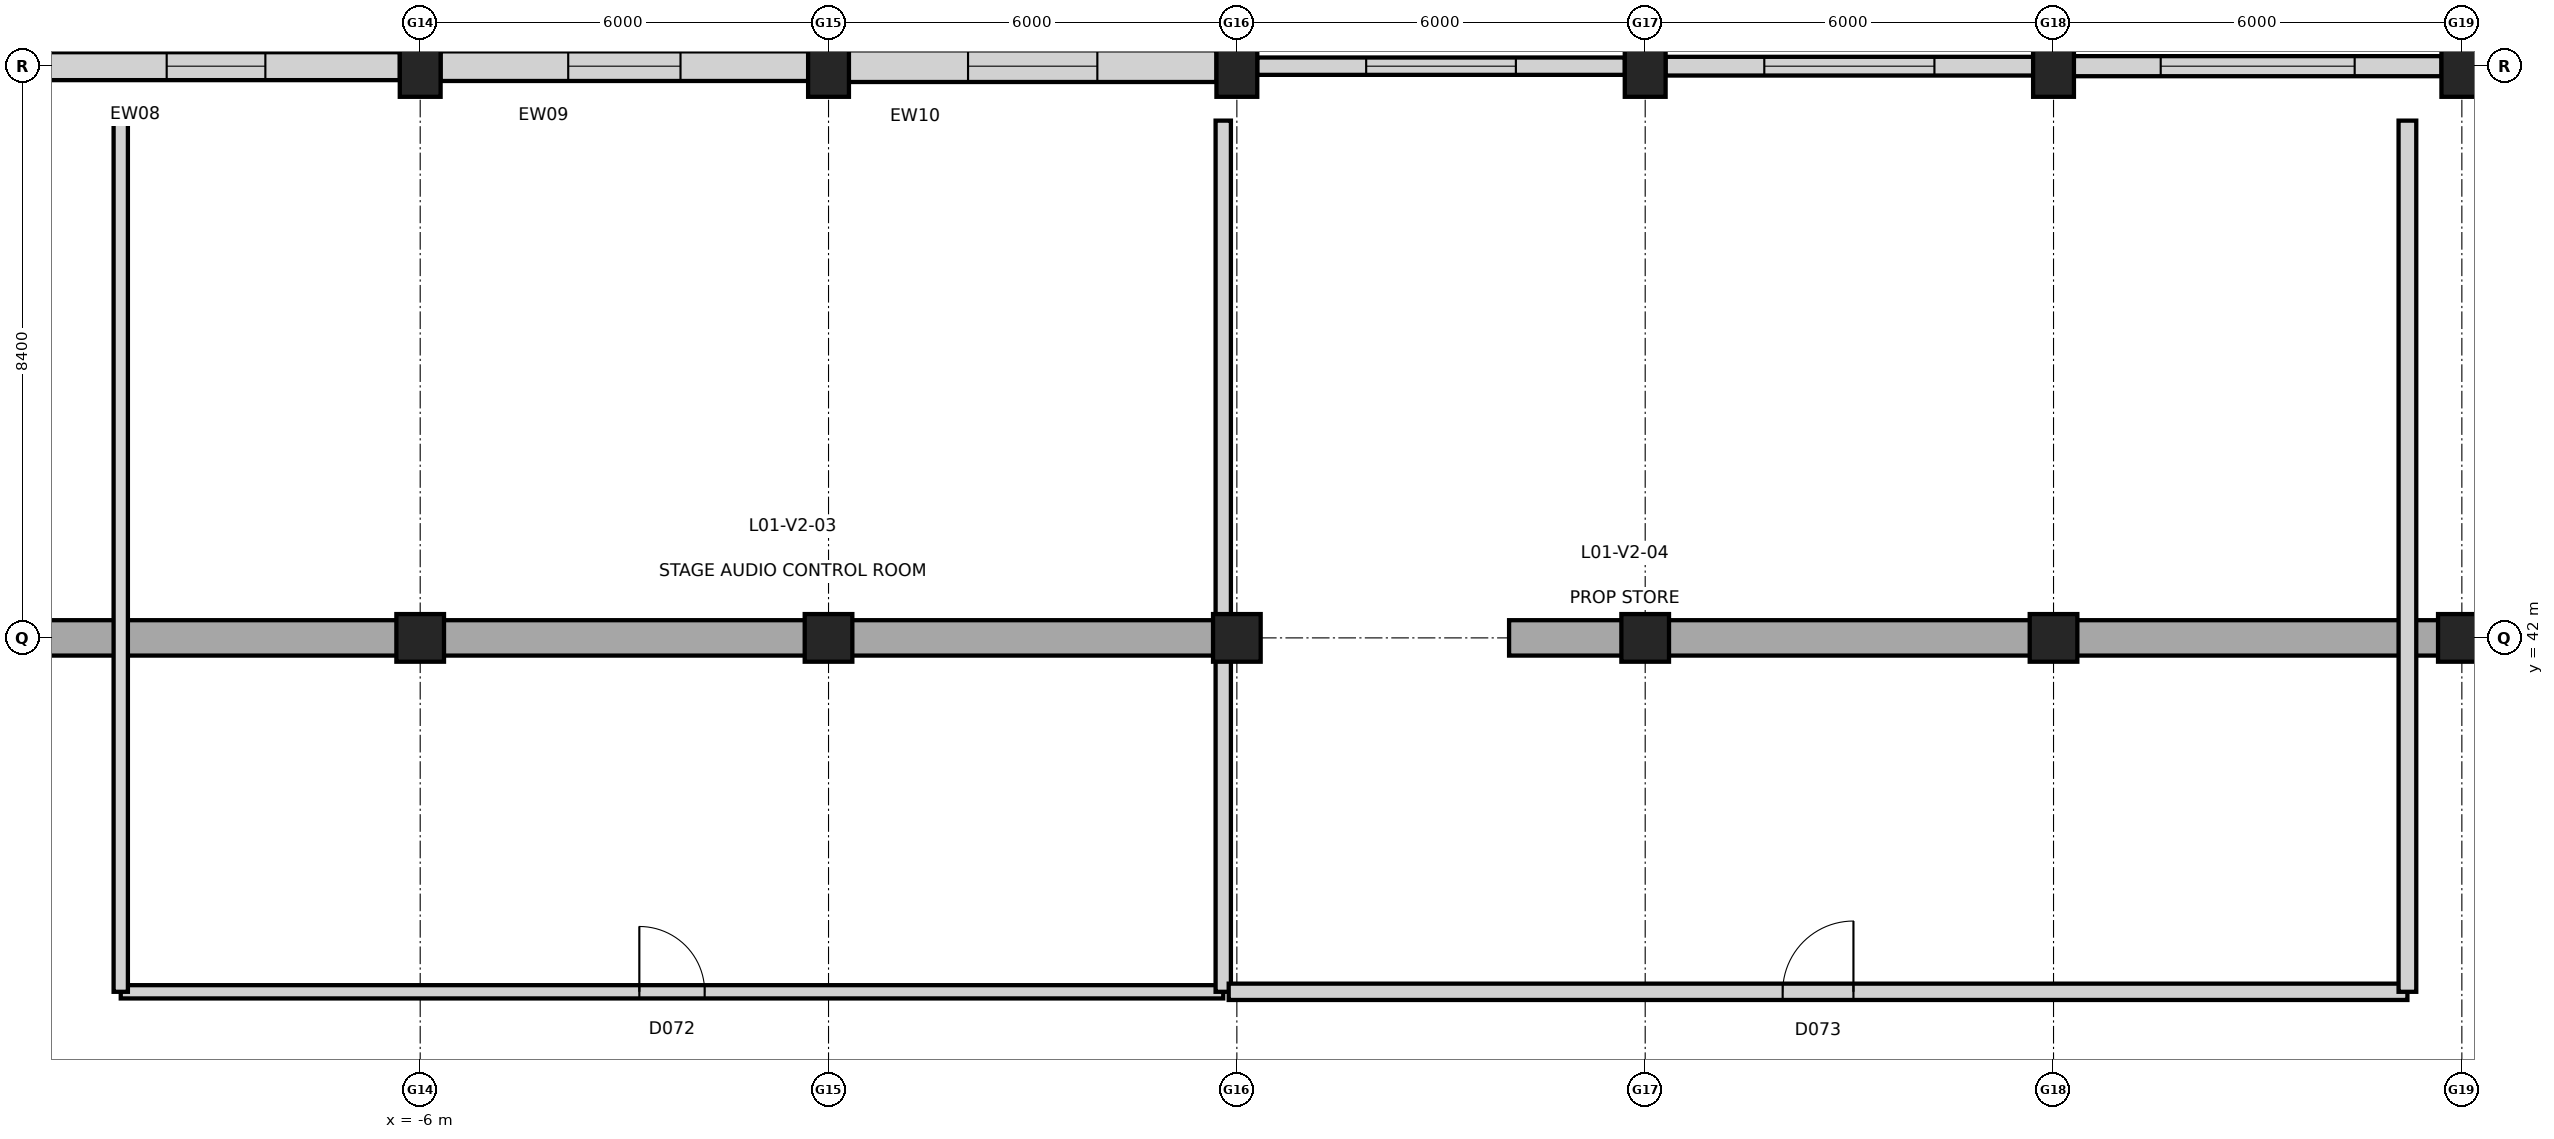
"""IFC4 building model, lengths in metres.
Left out: names, types, materials, properties, quantities, classifications, styles, units other than length and angle.
Written with IfcOpenShell. Run it as: python <this file> out.ifc"""

import sys

from ifc_helpers import new_model, si_unit, direction, frame, frame_2d, origin, origin_2d, place, context, subcontext, project, spatial, rectangle, extrude, element, fill, save


model = new_model("IFC4")
c1 = context("Model", 3, precision=1e-05, world=origin(), true_north=direction((0.0, 1.0)))
c2 = subcontext(c1, "Body", "Model", "MODEL_VIEW")
j1 = project(units=[si_unit("LENGTHUNIT", "METRE"), si_unit("PLANEANGLEUNIT", "RADIAN")], contexts=[c1])
p1 = place(None, origin())
s1 = spatial("IfcSite", under=j1, at=p1, CompositionType="ELEMENT")
p2 = place(p1, origin())
s2 = spatial("IfcBuilding", under=s1, at=p2, CompositionType="ELEMENT")
p3 = place(p2, frame((0.0, 0.0, 5.4)))
s3 = spatial("IfcBuildingStorey", under=s2, at=p3, CompositionType="ELEMENT", Elevation=5.4)
p4 = place(p3, frame((-6.0, 42.0, 0.0), z_axis=(0.0, 0.0, 1.0), x_axis=(1.0, 0.0, 0.0)))
e1 = element("IfcColumn", 1, at=p4, inside=s3, PredefinedType="COLUMN", context=c2, shape_type="SweptSolid", body=[
    extrude(rectangle(XDim=0.7, YDim=0.7, at=origin_2d()), origin(), (0.0, 0.0, 1.0), 4.8),
])
p5 = place(p3, frame((-6.0, 50.4, 0.0), z_axis=(0.0, 0.0, 1.0), x_axis=(1.0, 0.0, 0.0)))
e2 = element("IfcColumn", 2, at=p5, inside=s3, PredefinedType="COLUMN", context=c2, shape_type="SweptSolid", body=[
    extrude(rectangle(XDim=0.6, YDim=0.9, at=origin_2d()), origin(), (0.0, 0.0, 1.0), 4.8),
])
p6 = place(p3, frame((0.0, 42.0, 0.0), z_axis=(0.0, 0.0, 1.0), x_axis=(1.0, 0.0, 0.0)))
e3 = element("IfcColumn", 3, at=p6, inside=s3, PredefinedType="COLUMN", context=c2, shape_type="SweptSolid", body=[
    extrude(rectangle(XDim=0.7, YDim=0.7, at=origin_2d()), origin(), (0.0, 0.0, 1.0), 4.8),
])
p7 = place(p3, frame((0.0, 50.4, 0.0), z_axis=(0.0, 0.0, 1.0), x_axis=(1.0, 0.0, 0.0)))
e4 = element("IfcColumn", 4, at=p7, inside=s3, PredefinedType="COLUMN", context=c2, shape_type="SweptSolid", body=[
    extrude(rectangle(XDim=0.6, YDim=0.9, at=origin_2d()), origin(), (0.0, 0.0, 1.0), 4.8),
])
p8 = place(p3, frame((6.0, 42.0, 0.0), z_axis=(0.0, 0.0, 1.0), x_axis=(1.0, 0.0, 0.0)))
e5 = element("IfcColumn", 5, at=p8, inside=s3, PredefinedType="COLUMN", context=c2, shape_type="SweptSolid", body=[
    extrude(rectangle(XDim=0.7, YDim=0.7, at=origin_2d()), origin(), (0.0, 0.0, 1.0), 4.8),
])
p9 = place(p3, frame((6.0, 50.4, 0.0), z_axis=(0.0, 0.0, 1.0), x_axis=(1.0, 0.0, 0.0)))
e6 = element("IfcColumn", 6, at=p9, inside=s3, PredefinedType="COLUMN", context=c2, shape_type="SweptSolid", body=[
    extrude(rectangle(XDim=0.6, YDim=0.9, at=origin_2d()), origin(), (0.0, 0.0, 1.0), 4.8),
])
p10 = place(p3, frame((12.0, 42.0, 0.0), z_axis=(0.0, 0.0, 1.0), x_axis=(1.0, 0.0, 0.0)))
e7 = element("IfcColumn", 7, at=p10, inside=s3, PredefinedType="COLUMN", context=c2, shape_type="SweptSolid", body=[
    extrude(rectangle(XDim=0.7, YDim=0.7, at=origin_2d()), origin(), (0.0, 0.0, 1.0), 4.8),
])
p11 = place(p3, frame((12.0, 50.4, 0.0), z_axis=(0.0, 0.0, 1.0), x_axis=(1.0, 0.0, 0.0)))
e8 = element("IfcColumn", 8, at=p11, inside=s3, PredefinedType="COLUMN", context=c2, shape_type="SweptSolid", body=[
    extrude(rectangle(XDim=0.6, YDim=0.9, at=origin_2d()), origin(), (0.0, 0.0, 1.0), 4.8),
])
p12 = place(p3, frame((18.0, 42.0, 0.0), z_axis=(0.0, 0.0, 1.0), x_axis=(1.0, 0.0, 0.0)))
e9 = element("IfcColumn", 9, at=p12, inside=s3, PredefinedType="COLUMN", context=c2, shape_type="SweptSolid", body=[
    extrude(rectangle(XDim=0.7, YDim=0.7, at=origin_2d()), origin(), (0.0, 0.0, 1.0), 4.8),
])
p13 = place(p3, frame((18.0, 50.4, 0.0), z_axis=(0.0, 0.0, 1.0), x_axis=(1.0, 0.0, 0.0)))
e10 = element("IfcColumn", 10, at=p13, inside=s3, PredefinedType="COLUMN", context=c2, shape_type="SweptSolid", body=[
    extrude(rectangle(XDim=0.6, YDim=0.9, at=origin_2d()), origin(), (0.0, 0.0, 1.0), 4.8),
])
p14 = place(p3, frame((24.0, 42.0, 0.0), z_axis=(0.0, 0.0, 1.0), x_axis=(1.0, 0.0, 0.0)))
e11 = element("IfcColumn", 11, at=p14, inside=s3, PredefinedType="COLUMN", context=c2, shape_type="SweptSolid", body=[
    extrude(rectangle(XDim=0.7, YDim=0.7, at=origin_2d()), origin(), (0.0, 0.0, 1.0), 4.8),
])
p15 = place(p3, frame((24.0, 50.4, 0.0), z_axis=(0.0, 0.0, 1.0), x_axis=(1.0, 0.0, 0.0)))
e12 = element("IfcColumn", 12, at=p15, inside=s3, PredefinedType="COLUMN", context=c2, shape_type="SweptSolid", body=[
    extrude(rectangle(XDim=0.6, YDim=0.9, at=origin_2d()), origin(), (0.0, 0.0, 1.0), 4.8),
])
p16 = place(p3, frame((-17.0, 42.0, 0.0), z_axis=(0.0, 0.0, 1.0), x_axis=(1.0, 0.0, 0.0)))
e13 = element("IfcWall", 13, at=p16, inside=s3, PredefinedType="SHEAR", context=c2, shape_type="SweptSolid", body=[
    extrude(rectangle(XDim=23.0, YDim=0.52, at=frame_2d((11.5, 0.0))), origin(), (0.0, 0.0, 1.0), 4.8),
])
p17 = place(p3, frame((10.0, 42.0, 0.0), z_axis=(0.0, 0.0, 1.0), x_axis=(1.0, 0.0, 0.0)))
e14 = element("IfcWall", 14, at=p17, inside=s3, PredefinedType="SHEAR", context=c2, shape_type="SweptSolid", body=[
    extrude(rectangle(XDim=19.0, YDim=0.52, at=frame_2d((9.5, 0.0))), origin(), (0.0, 0.0, 1.0), 4.8),
])
p18 = place(p3, frame((-11.702, 50.4, 0.0), z_axis=(0.0, 0.0, 1.0), x_axis=(1.0, 0.0, 0.0)))
e15 = element("IfcWall", 15, at=p18, inside=s3, PredefinedType="STANDARD", context=c2, shape_type="SweptSolid", body=[
    extrude(rectangle(XDim=5.404, YDim=0.41, at=frame_2d((2.702, 0.0))), origin(), (0.0, 0.0, 1.0), 3.74),
])
p19 = place(p18, frame((1.977, 0.0, 0.85)))
e16 = element("IfcOpeningElement", 16, at=p19, cuts=e15, PredefinedType="OPENING", context=c2, shape_type="SweptSolid", body=[
    extrude(rectangle(XDim=1.45, YDim=2.1, at=frame_2d((0.725, 1.05))), frame((0.0, 0.215, 0.0), z_axis=(0.0, -1.0, 0.0), x_axis=(1.0, 0.0, 0.0)), (0.0, 0.0, 1.0), 0.43),
])
p20 = place(p3, frame((-5.702, 50.4, 0.0), z_axis=(0.0, 0.0, 1.0), x_axis=(1.0, 0.0, 0.0)))
e17 = element("IfcWall", 17, at=p20, inside=s3, PredefinedType="STANDARD", context=c2, shape_type="SweptSolid", body=[
    extrude(rectangle(XDim=5.404, YDim=0.435, at=frame_2d((2.702, 0.0))), origin(), (0.0, 0.0, 1.0), 3.74),
])
p21 = place(p20, frame((1.877, 0.0, 0.85)))
e18 = element("IfcOpeningElement", 18, at=p21, cuts=e17, PredefinedType="OPENING", context=c2, shape_type="SweptSolid", body=[
    extrude(rectangle(XDim=1.65, YDim=2.1, at=frame_2d((0.825, 1.05))), frame((0.0, 0.228, 0.0), z_axis=(0.0, -1.0, 0.0), x_axis=(1.0, 0.0, 0.0)), (0.0, 0.0, 1.0), 0.455),
])
p22 = place(p3, frame((0.298, 50.4, 0.0), z_axis=(0.0, 0.0, 1.0), x_axis=(1.0, 0.0, 0.0)))
e19 = element("IfcWall", 19, at=p22, inside=s3, PredefinedType="STANDARD", context=c2, shape_type="SweptSolid", body=[
    extrude(rectangle(XDim=5.404, YDim=0.465, at=frame_2d((2.702, 0.0))), origin(), (0.0, 0.0, 1.0), 3.74),
])
p23 = place(p22, frame((1.752, 0.0, 0.85)))
e20 = element("IfcOpeningElement", 20, at=p23, cuts=e19, PredefinedType="OPENING", context=c2, shape_type="SweptSolid", body=[
    extrude(rectangle(XDim=1.9, YDim=2.1, at=frame_2d((0.95, 1.05))), frame((0.0, 0.242, 0.0), z_axis=(0.0, -1.0, 0.0), x_axis=(1.0, 0.0, 0.0)), (0.0, 0.0, 1.0), 0.485),
])
p24 = place(p3, frame((6.298, 50.4, 0.0), z_axis=(0.0, 0.0, 1.0), x_axis=(1.0, 0.0, 0.0)))
e21 = element("IfcWall", 21, at=p24, inside=s3, PredefinedType="STANDARD", context=c2, shape_type="SweptSolid", body=[
    extrude(rectangle(XDim=5.404, YDim=0.255, at=frame_2d((2.702, 0.0))), origin(), (0.0, 0.0, 1.0), 3.74),
])
p25 = place(p24, frame((1.602, 0.0, 0.85)))
e22 = element("IfcOpeningElement", 22, at=p25, cuts=e21, PredefinedType="OPENING", context=c2, shape_type="SweptSolid", body=[
    extrude(rectangle(XDim=2.2, YDim=2.1, at=frame_2d((1.1, 1.05))), frame((0.0, 0.137, 0.0), z_axis=(0.0, -1.0, 0.0), x_axis=(1.0, 0.0, 0.0)), (0.0, 0.0, 1.0), 0.275),
])
p26 = place(p3, frame((12.298, 50.4, 0.0), z_axis=(0.0, 0.0, 1.0), x_axis=(1.0, 0.0, 0.0)))
e23 = element("IfcWall", 23, at=p26, inside=s3, PredefinedType="STANDARD", context=c2, shape_type="SweptSolid", body=[
    extrude(rectangle(XDim=5.404, YDim=0.275, at=frame_2d((2.702, 0.0))), origin(), (0.0, 0.0, 1.0), 3.74),
])
p27 = place(p26, frame((1.452, 0.0, 0.85)))
e24 = element("IfcOpeningElement", 24, at=p27, cuts=e23, PredefinedType="OPENING", context=c2, shape_type="SweptSolid", body=[
    extrude(rectangle(XDim=2.5, YDim=2.1, at=frame_2d((1.25, 1.05))), frame((0.0, 0.147, 0.0), z_axis=(0.0, -1.0, 0.0), x_axis=(1.0, 0.0, 0.0)), (0.0, 0.0, 1.0), 0.295),
])
p28 = place(p3, frame((18.298, 50.4, 0.0), z_axis=(0.0, 0.0, 1.0), x_axis=(1.0, 0.0, 0.0)))
e25 = element("IfcWall", 25, at=p28, inside=s3, PredefinedType="STANDARD", context=c2, shape_type="SweptSolid", body=[
    extrude(rectangle(XDim=5.404, YDim=0.295, at=frame_2d((2.702, 0.0))), origin(), (0.0, 0.0, 1.0), 3.74),
])
p29 = place(p28, frame((1.277, 0.0, 0.85)))
e26 = element("IfcOpeningElement", 26, at=p29, cuts=e25, PredefinedType="OPENING", context=c2, shape_type="SweptSolid", body=[
    extrude(rectangle(XDim=2.85, YDim=2.1, at=frame_2d((1.425, 1.05))), frame((0.0, 0.157, 0.0), z_axis=(0.0, -1.0, 0.0), x_axis=(1.0, 0.0, 0.0)), (0.0, 0.0, 1.0), 0.315),
])
p30 = place(p3, frame((-10.4, 36.8, 0.0), z_axis=(0.0, 0.0, 1.0), x_axis=(1.0, 0.0, 0.0)))
e27 = element("IfcWall", 27, at=p30, inside=s3, PredefinedType="PARTITIONING", context=c2, shape_type="SweptSolid", body=[
    extrude(rectangle(XDim=16.2, YDim=0.195, at=frame_2d((8.1, 0.0))), origin(), (0.0, 0.0, 1.0), 4.42),
])
p31 = place(p30, frame((7.62, 0.0, 0.0)))
e28 = element("IfcOpeningElement", 28, at=p31, cuts=e27, PredefinedType="OPENING", context=c2, shape_type="SweptSolid", body=[
    extrude(rectangle(XDim=0.96, YDim=2.2, at=frame_2d((0.48, 1.1))), frame((0.0, 0.107, 0.0), z_axis=(0.0, -1.0, 0.0), x_axis=(1.0, 0.0, 0.0)), (0.0, 0.0, 1.0), 0.215),
])
p32 = place(p3, frame((-10.4, 36.8, 0.0), z_axis=(0.0, 0.0, 1.0), x_axis=(0.0, 1.0, 0.0)))
e29 = element("IfcWall", 29, at=p32, inside=s3, PredefinedType="PARTITIONING", context=c2, shape_type="SweptSolid", body=[
    extrude(rectangle(XDim=12.8, YDim=0.21, at=frame_2d((6.4, 0.0))), origin(), (0.0, 0.0, 1.0), 4.42),
])
p33 = place(p3, frame((5.8, 36.8, 0.0), z_axis=(0.0, 0.0, 1.0), x_axis=(0.0, 1.0, 0.0)))
e30 = element("IfcWall", 30, at=p33, inside=s3, PredefinedType="PARTITIONING", context=c2, shape_type="SweptSolid", body=[
    extrude(rectangle(XDim=12.8, YDim=0.225, at=frame_2d((6.4, 0.0))), origin(), (0.0, 0.0, 1.0), 3.585),
])
p34 = place(p3, frame((5.88, 36.8, 0.0), z_axis=(0.0, 0.0, 1.0), x_axis=(1.0, 0.0, 0.0)))
e31 = element("IfcWall", 31, at=p34, inside=s3, PredefinedType="PARTITIONING", context=c2, shape_type="SweptSolid", body=[
    extrude(rectangle(XDim=17.32, YDim=0.24, at=frame_2d((8.66, 0.0))), origin(), (0.0, 0.0, 1.0), 4.42),
])
p35 = place(p34, frame((8.14, 0.0, 0.0)))
e32 = element("IfcOpeningElement", 32, at=p35, cuts=e31, PredefinedType="OPENING", context=c2, shape_type="SweptSolid", body=[
    extrude(rectangle(XDim=1.04, YDim=2.2, at=frame_2d((0.52, 1.1))), frame((0.0, 0.13, 0.0), z_axis=(0.0, -1.0, 0.0), x_axis=(1.0, 0.0, 0.0)), (0.0, 0.0, 1.0), 0.26),
])
p36 = place(p3, frame((23.2, 36.8, 0.0), z_axis=(0.0, 0.0, 1.0), x_axis=(0.0, 1.0, 0.0)))
e33 = element("IfcWall", 33, at=p36, inside=s3, PredefinedType="PARTITIONING", context=c2, shape_type="SweptSolid", body=[
    extrude(rectangle(XDim=12.8, YDim=0.26, at=frame_2d((6.4, 0.0))), origin(), (0.0, 0.0, 1.0), 4.42),
])
p37 = place(p19, origin())
e34 = element("IfcWindow", 34, at=p37, inside=s3, PartitioningType="SINGLE_PANEL", PredefinedType="WINDOW", context=c2, shape_type="SweptSolid", body=[
    extrude(rectangle(XDim=1.45, YDim=2.1, at=frame_2d((0.725, 1.05))), frame((0.0, 0.03, 0.0), z_axis=(0.0, -1.0, 0.0), x_axis=(1.0, 0.0, 0.0)), (0.0, 0.0, 1.0), 0.06),
])
fill(e16, e34)
p38 = place(p21, origin())
e35 = element("IfcWindow", 35, at=p38, inside=s3, PartitioningType="SINGLE_PANEL", PredefinedType="WINDOW", context=c2, shape_type="SweptSolid", body=[
    extrude(rectangle(XDim=1.65, YDim=2.1, at=frame_2d((0.825, 1.05))), frame((0.0, 0.03, 0.0), z_axis=(0.0, -1.0, 0.0), x_axis=(1.0, 0.0, 0.0)), (0.0, 0.0, 1.0), 0.06),
])
fill(e18, e35)
p39 = place(p23, origin())
e36 = element("IfcWindow", 36, at=p39, inside=s3, PartitioningType="SINGLE_PANEL", PredefinedType="WINDOW", context=c2, shape_type="SweptSolid", body=[
    extrude(rectangle(XDim=1.9, YDim=2.1, at=frame_2d((0.95, 1.05))), frame((0.0, 0.03, 0.0), z_axis=(0.0, -1.0, 0.0), x_axis=(1.0, 0.0, 0.0)), (0.0, 0.0, 1.0), 0.06),
])
fill(e20, e36)
p40 = place(p25, origin())
e37 = element("IfcWindow", 37, at=p40, inside=s3, PartitioningType="SINGLE_PANEL", PredefinedType="WINDOW", context=c2, shape_type="SweptSolid", body=[
    extrude(rectangle(XDim=2.2, YDim=2.1, at=frame_2d((1.1, 1.05))), frame((0.0, 0.03, 0.0), z_axis=(0.0, -1.0, 0.0), x_axis=(1.0, 0.0, 0.0)), (0.0, 0.0, 1.0), 0.06),
])
fill(e22, e37)
p41 = place(p27, origin())
e38 = element("IfcWindow", 38, at=p41, inside=s3, PartitioningType="SINGLE_PANEL", PredefinedType="WINDOW", context=c2, shape_type="SweptSolid", body=[
    extrude(rectangle(XDim=2.5, YDim=2.1, at=frame_2d((1.25, 1.05))), frame((0.0, 0.03, 0.0), z_axis=(0.0, -1.0, 0.0), x_axis=(1.0, 0.0, 0.0)), (0.0, 0.0, 1.0), 0.06),
])
fill(e24, e38)
p42 = place(p29, origin())
e39 = element("IfcWindow", 39, at=p42, inside=s3, PartitioningType="SINGLE_PANEL", PredefinedType="WINDOW", context=c2, shape_type="SweptSolid", body=[
    extrude(rectangle(XDim=2.85, YDim=2.1, at=frame_2d((1.425, 1.05))), frame((0.0, 0.03, 0.0), z_axis=(0.0, -1.0, 0.0), x_axis=(1.0, 0.0, 0.0)), (0.0, 0.0, 1.0), 0.06),
])
fill(e26, e39)
p43 = place(p31, origin())
e40 = element("IfcDoor", 40, at=p43, inside=s3, OperationType="SINGLE_SWING_LEFT", PredefinedType="DOOR", context=c2, shape_type="SweptSolid", body=[
    extrude(rectangle(XDim=0.96, YDim=2.2, at=frame_2d((0.48, 1.1))), frame((0.0, 0.025, 0.0), z_axis=(0.0, -1.0, 0.0), x_axis=(1.0, 0.0, 0.0)), (0.0, 0.0, 1.0), 0.05),
])
fill(e28, e40)
p44 = place(p35, origin())
e41 = element("IfcDoor", 41, at=p44, inside=s3, OperationType="SINGLE_SWING_RIGHT", PredefinedType="DOOR", context=c2, shape_type="SweptSolid", body=[
    extrude(rectangle(XDim=1.04, YDim=2.2, at=frame_2d((0.52, 1.1))), frame((0.0, 0.025, 0.0), z_axis=(0.0, -1.0, 0.0), x_axis=(1.0, 0.0, 0.0)), (0.0, 0.0, 1.0), 0.05),
])
fill(e32, e41)
save(model, sys.argv[1])
